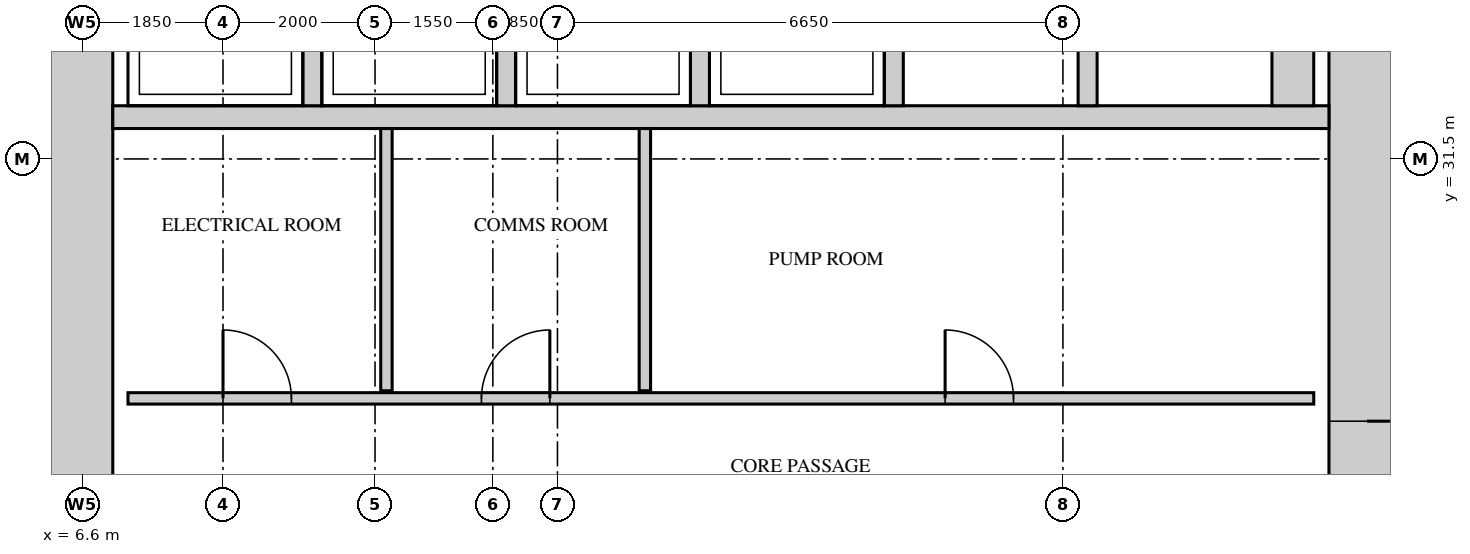
"""IFC4 building model, lengths in metres.
Left out: names, types, materials, properties, quantities, classifications, styles, units other than length and angle.
Written with IfcOpenShell. Run it as: python <this file> out.ifc"""

import sys

from ifc_helpers import new_model, si_unit, direction, frame, frame_2d, origin, place, context, subcontext, project, spatial, rectangle, extrude, source, transform, mapped, element, fill, save


model = new_model("IFC4")
c1 = context("Model", 3, precision=1e-05, world=origin(), true_north=direction((0.0, 1.0)))
c2 = subcontext(c1, "Body", "Model", "MODEL_VIEW")
j1 = project(units=[si_unit("LENGTHUNIT", "METRE"), si_unit("PLANEANGLEUNIT", "RADIAN")], contexts=[c1])
p1 = place(None, origin())
s1 = spatial("IfcSite", under=j1, at=p1, CompositionType="ELEMENT")
p2 = place(p1, origin())
s2 = spatial("IfcBuilding", under=s1, at=p2, CompositionType="ELEMENT")
p3 = place(p2, frame((0.0, 0.0, 119.1)))
s3 = spatial("IfcBuildingStorey", under=s2, at=p3, CompositionType="ELEMENT", Elevation=119.1)
m1 = source(origin(), c2, "Body", "SweptSolid", [
    extrude(rectangle(XDim=28.0, YDim=1.0, at=frame_2d((14.0, 0.0))), origin(), (0.0, 0.0, 1.0), 4.1),
])
p4 = place(p3, frame((23.5, 13.0, 0.0), z_axis=(0.0, 0.0, 1.0), x_axis=(0.0, 1.0, 0.0)))
e1 = element("IfcWall", 1, at=p4, inside=s3, PredefinedType="SHEAR", context=c2, shape_type="MappedRepresentation", body=[
    mapped(m1, transform((0.0, 0.0, 0.0))),
])
m2 = source(origin(), c2, "Body", "SweptSolid", [
    extrude(rectangle(XDim=1.8, YDim=2.1, at=frame_2d((0.9, 1.05))), frame((0.0, 0.51, 0.0), z_axis=(0.0, -1.0, 0.0), x_axis=(1.0, 0.0, 0.0)), (0.0, 0.0, 1.0), 1.02),
])
p5 = place(p4, frame((22.6, 0.0, 0.0)))
e2 = element("IfcOpeningElement", 2, at=p5, cuts=e1, PredefinedType="OPENING", context=c2, shape_type="MappedRepresentation", body=[
    mapped(m2, transform((0.0, 0.0, 0.0))),
])
m3 = source(origin(), c2, "Body", "SweptSolid", [
    extrude(rectangle(XDim=1.2, YDim=2.1, at=frame_2d((0.6, 1.05))), frame((0.0, 0.51, 0.0), z_axis=(0.0, -1.0, 0.0), x_axis=(1.0, 0.0, 0.0)), (0.0, 0.0, 1.0), 1.02),
])
p6 = place(p4, frame((13.85, 0.0, 0.0)))
e3 = element("IfcOpeningElement", 3, at=p6, cuts=e1, PredefinedType="OPENING", context=c2, shape_type="MappedRepresentation", body=[
    mapped(m3, transform((0.0, 0.0, 0.0))),
])
m4 = source(origin(), c2, "Body", "SweptSolid", [
    extrude(rectangle(XDim=0.9, YDim=2.1, at=frame_2d((0.45, 1.05))), frame((0.0, 0.51, 0.0), z_axis=(0.0, -1.0, 0.0), x_axis=(1.0, 0.0, 0.0)), (0.0, 0.0, 1.0), 1.02),
])
p7 = place(p4, frame((2.15, 0.0, 0.0)))
e4 = element("IfcOpeningElement", 4, at=p7, cuts=e1, PredefinedType="OPENING", context=c2, shape_type="MappedRepresentation", body=[
    mapped(m4, transform((0.0, 0.0, 0.0))),
])
p8 = place(p4, frame((7.0, 0.0, 0.0)))
e5 = element("IfcOpeningElement", 5, at=p8, cuts=e1, PredefinedType="OPENING", context=c2, shape_type="MappedRepresentation", body=[
    mapped(m4, transform((0.0, 0.0, 0.0))),
])
p9 = place(p3, frame((6.5, 13.0, 0.0), z_axis=(0.0, 0.0, 1.0), x_axis=(0.0, 1.0, 0.0)))
e6 = element("IfcWall", 6, at=p9, inside=s3, PredefinedType="SHEAR", context=c2, shape_type="MappedRepresentation", body=[
    mapped(m1, transform((0.0, 0.0, 0.0))),
])
m5 = source(origin(), c2, "Body", "SweptSolid", [
    extrude(rectangle(XDim=16.0, YDim=0.3, at=frame_2d((8.0, 0.0))), origin(), (0.0, 0.0, 1.0), 4.1),
])
p10 = place(p3, frame((7.0, 32.05, 0.0), z_axis=(0.0, 0.0, 1.0), x_axis=(1.0, 0.0, 0.0)))
e7 = element("IfcWall", 7, at=p10, inside=s3, PredefinedType="STANDARD", context=c2, shape_type="MappedRepresentation", body=[
    mapped(m5, transform((0.0, 0.0, 0.0))),
])
m6 = source(origin(), c2, "Body", "SweptSolid", [
    extrude(rectangle(XDim=2.4, YDim=0.25, at=frame_2d((1.2, 0.0))), origin(), (0.0, 0.0, 1.0), 4.1),
])
for number, where, z_axis, x_axis in (
    (8, (9.625, 32.2, 0.0), (0.0, 0.0, 1.0), (0.0, 1.0, 0.0)),
    (9, (12.175, 32.2, 0.0), (0.0, 0.0, 1.0), (0.0, 1.0, 0.0)),
    (10, (14.725, 32.2, 0.0), (0.0, 0.0, 1.0), (0.0, 1.0, 0.0)),
    (11, (17.275, 32.2, 0.0), (0.0, 0.0, 1.0), (0.0, 1.0, 0.0)),
    (12, (19.825, 32.2, 0.0), (0.0, 0.0, 1.0), (0.0, 1.0, 0.0)),
):
    element("IfcWall", number, at=place(p3, frame(where, z_axis=z_axis, x_axis=x_axis)), inside=s3, PredefinedType="STANDARD", context=c2, shape_type="MappedRepresentation", body=[
        mapped(m6, transform((0.0, 0.0, 0.0))),
    ])
m7 = source(origin(), c2, "Body", "SweptSolid", [
    extrude(rectangle(XDim=2.4, YDim=0.55, at=frame_2d((1.2, 0.0))), origin(), (0.0, 0.0, 1.0), 4.1),
])
p11 = place(p3, frame((22.525, 32.2, 0.0), z_axis=(0.0, 0.0, 1.0), x_axis=(0.0, 1.0, 0.0)))
e13 = element("IfcWall", 13, at=p11, inside=s3, PredefinedType="STANDARD", context=c2, shape_type="MappedRepresentation", body=[
    mapped(m7, transform((0.0, 0.0, 0.0))),
])
m8 = source(origin(), c2, "Body", "SweptSolid", [
    extrude(rectangle(XDim=15.6, YDim=0.15, at=frame_2d((7.8, 0.0))), origin(), (0.0, 0.0, 1.0), 4.2),
])
p12 = place(p3, frame((7.2, 28.35, 0.0), z_axis=(0.0, 0.0, 1.0), x_axis=(1.0, 0.0, 0.0)))
e14 = element("IfcWall", 14, at=p12, inside=s3, PredefinedType="PARTITIONING", context=c2, shape_type="MappedRepresentation", body=[
    mapped(m8, transform((0.0, 0.0, 0.0))),
])
m9 = source(origin(), c2, "Body", "SweptSolid", [
    extrude(rectangle(XDim=0.9, YDim=2.1, at=frame_2d((0.45, 1.05))), frame((0.0, 0.085, 0.0), z_axis=(0.0, -1.0, 0.0), x_axis=(1.0, 0.0, 0.0)), (0.0, 0.0, 1.0), 0.17),
])
p13 = place(p12, frame((1.25, 0.0, 0.0)))
e15 = element("IfcOpeningElement", 15, at=p13, cuts=e14, PredefinedType="OPENING", context=c2, shape_type="MappedRepresentation", body=[
    mapped(m9, transform((0.0, 0.0, 0.0))),
])
p14 = place(p12, frame((4.65, 0.0, 0.0)))
e16 = element("IfcOpeningElement", 16, at=p14, cuts=e14, PredefinedType="OPENING", context=c2, shape_type="MappedRepresentation", body=[
    mapped(m9, transform((0.0, 0.0, 0.0))),
])
p15 = place(p12, frame((10.75, 0.0, 0.0)))
e17 = element("IfcOpeningElement", 17, at=p15, cuts=e14, PredefinedType="OPENING", context=c2, shape_type="MappedRepresentation", body=[
    mapped(m9, transform((0.0, 0.0, 0.0))),
])
m10 = source(origin(), c2, "Body", "SweptSolid", [
    extrude(rectangle(XDim=3.45, YDim=0.15, at=frame_2d((1.725, 0.0))), origin(), (0.0, 0.0, 1.0), 4.2),
])
for number, where, z_axis, x_axis in (
    (18, (10.6, 28.45, 0.0), (0.0, 0.0, 1.0), (0.0, 1.0, 0.0)),
    (19, (14.0, 28.45, 0.0), (0.0, 0.0, 1.0), (0.0, 1.0, 0.0)),
):
    element("IfcWall", number, at=place(p3, frame(where, z_axis=z_axis, x_axis=x_axis)), inside=s3, PredefinedType="PARTITIONING", context=c2, shape_type="MappedRepresentation", body=[
        mapped(m10, transform((0.0, 0.0, 0.0))),
    ])
m11 = source(origin(), c2, "Body", "SweptSolid", [
    extrude(rectangle(XDim=1.2, YDim=2.1, at=frame_2d((0.6, 1.05))), frame((0.0, 0.45, 0.0), z_axis=(0.0, -1.0, 0.0), x_axis=(1.0, 0.0, 0.0)), (0.0, 0.0, 1.0), 0.9),
])
p16 = place(p6, origin())
e20 = element("IfcDoor", 20, at=p16, inside=s3, OperationType="SINGLE_SWING_RIGHT", PredefinedType="DOOR", context=c2, shape_type="MappedRepresentation", body=[
    mapped(m11, transform((0.0, 0.0, 0.0))),
])
fill(e3, e20)
m12 = source(origin(), c2, "Body", "SweptSolid", [
    extrude(rectangle(XDim=0.9, YDim=2.1, at=frame_2d((0.45, 1.05))), frame((0.0, 0.025, 0.0), z_axis=(0.0, -1.0, 0.0), x_axis=(1.0, 0.0, 0.0)), (0.0, 0.0, 1.0), 0.05),
])
p17 = place(p13, origin())
e21 = element("IfcDoor", 21, at=p17, inside=s3, OperationType="SINGLE_SWING_RIGHT", PredefinedType="DOOR", context=c2, shape_type="MappedRepresentation", body=[
    mapped(m12, transform((0.0, 0.0, 0.0))),
])
fill(e15, e21)
p18 = place(p14, origin())
e22 = element("IfcDoor", 22, at=p18, inside=s3, OperationType="SINGLE_SWING_LEFT", PredefinedType="DOOR", context=c2, shape_type="MappedRepresentation", body=[
    mapped(m12, transform((0.0, 0.0, 0.0))),
])
fill(e16, e22)
p19 = place(p15, origin())
e23 = element("IfcDoor", 23, at=p19, inside=s3, OperationType="SINGLE_SWING_RIGHT", PredefinedType="DOOR", context=c2, shape_type="MappedRepresentation", body=[
    mapped(m12, transform((0.0, 0.0, 0.0))),
])
fill(e17, e23)
save(model, sys.argv[1])
